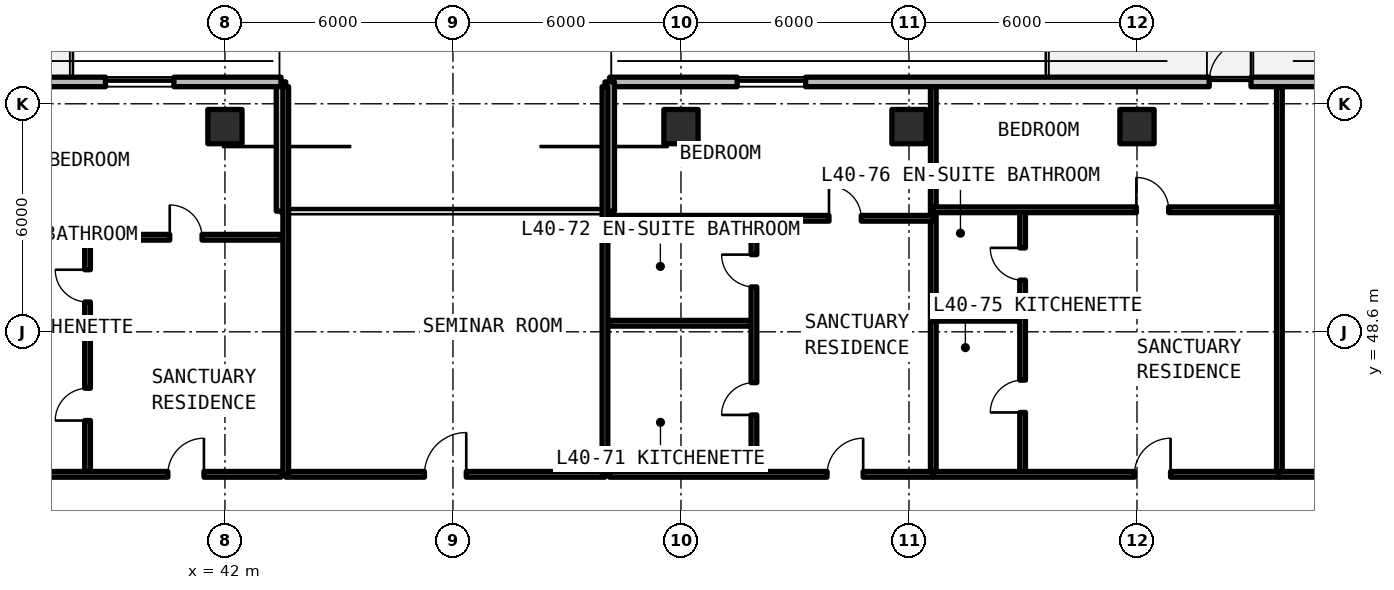
"""IFC4 building model, lengths in metres.
Left out: names, types, materials, properties, quantities, classifications, styles, units other than length and angle.
Written with IfcOpenShell. Run it as: python <this file> out.ifc"""

import sys

from ifc_helpers import new_model, si_unit, direction, frame, frame_2d, origin, origin_2d, place, context, subcontext, project, spatial, rectangle, extrude, element, fill, save


model = new_model("IFC4")
c1 = context("Model", 3, precision=1e-05, world=origin(), true_north=direction((0.0, 1.0)))
c2 = subcontext(c1, "Body", "Model", "MODEL_VIEW")
j1 = project(units=[si_unit("LENGTHUNIT", "METRE"), si_unit("PLANEANGLEUNIT", "RADIAN")], contexts=[c1])
p1 = place(None, origin())
s1 = spatial("IfcSite", under=j1, at=p1, CompositionType="ELEMENT")
p2 = place(p1, origin())
s2 = spatial("IfcBuilding", under=s1, at=p2, CompositionType="ELEMENT")
p3 = place(p2, frame((0.0, 0.0, 145.2)))
s3 = spatial("IfcBuildingStorey", under=s2, at=p3, CompositionType="ELEMENT", Elevation=145.2)
for number, where, z_axis, x_axis in (
    (1, (42.0, 54.0, 0.0), (0.0, 0.0, 1.0), (1.0, 0.0, 0.0)),
    (2, (54.0, 54.0, 0.0), (0.0, 0.0, 1.0), (1.0, 0.0, 0.0)),
    (3, (60.0, 54.0, 0.0), (0.0, 0.0, 1.0), (1.0, 0.0, 0.0)),
    (4, (66.0, 54.0, 0.0), (0.0, 0.0, 1.0), (1.0, 0.0, 0.0)),
):
    element("IfcColumn", number, at=place(p3, frame(where, z_axis=z_axis, x_axis=x_axis)), inside=s3, PredefinedType="COLUMN", context=c2, shape_type="SweptSolid", body=[
        extrude(rectangle(XDim=0.9, YDim=0.9, at=origin_2d()), origin(), (0.0, 0.0, 1.0), 3.3),
    ])
p4 = place(p3, frame((95.748, 55.175, 0.0), z_axis=(0.0, 0.0, 1.0), x_axis=(-1.0, 0.0, 0.0)))
e5 = element("IfcWall", 5, at=p4, inside=s3, PredefinedType="SOLIDWALL", context=c2, shape_type="SweptSolid", body=[
    extrude(rectangle(XDim=43.623, YDim=0.25, at=frame_2d((21.812, 0.0))), origin(), (0.0, 0.0, 1.0), 3.08),
])
p5 = place(p4, frame((26.748, 0.0, 0.0)))
e6 = element("IfcOpeningElement", 6, at=p5, cuts=e5, PredefinedType="OPENING", context=c2, shape_type="SweptSolid", body=[
    extrude(rectangle(XDim=1.1, YDim=2.15, at=frame_2d((0.55, 1.075))), frame((0.0, 0.135, 0.0), z_axis=(0.0, -1.0, 0.0), x_axis=(1.0, 0.0, 0.0)), (0.0, 0.0, 1.0), 0.27),
])
p6 = place(p4, frame((14.898, 0.0, 0.0)))
e7 = element("IfcOpeningElement", 7, at=p6, cuts=e5, PredefinedType="OPENING", context=c2, shape_type="SweptSolid", body=[
    extrude(rectangle(XDim=1.1, YDim=2.15, at=frame_2d((0.55, 1.075))), frame((0.0, 0.135, 0.0), z_axis=(0.0, -1.0, 0.0), x_axis=(1.0, 0.0, 0.0)), (0.0, 0.0, 1.0), 0.27),
])
p7 = place(p4, frame((38.468, 0.0, 0.78)))
e8 = element("IfcOpeningElement", 8, at=p7, cuts=e5, PredefinedType="OPENING", context=c2, shape_type="SweptSolid", body=[
    extrude(rectangle(XDim=1.8, YDim=1.66, at=frame_2d((0.9, 0.83))), frame((0.0, 0.135, 0.0), z_axis=(0.0, -1.0, 0.0), x_axis=(1.0, 0.0, 0.0)), (0.0, 0.0, 1.0), 0.27),
])
p8 = place(p4, frame((20.841, 0.0, 0.78)))
e9 = element("IfcOpeningElement", 9, at=p8, cuts=e5, PredefinedType="OPENING", context=c2, shape_type="SweptSolid", body=[
    extrude(rectangle(XDim=1.8, YDim=1.66, at=frame_2d((0.9, 0.83))), frame((0.0, 0.135, 0.0), z_axis=(0.0, -1.0, 0.0), x_axis=(1.0, 0.0, 0.0)), (0.0, 0.0, 1.0), 0.27),
])
p9 = place(p4, frame((3.188, 0.0, 0.78)))
e10 = element("IfcOpeningElement", 10, at=p9, cuts=e5, PredefinedType="OPENING", context=c2, shape_type="SweptSolid", body=[
    extrude(rectangle(XDim=1.8, YDim=1.66, at=frame_2d((0.9, 0.83))), frame((0.0, 0.135, 0.0), z_axis=(0.0, -1.0, 0.0), x_axis=(1.0, 0.0, 0.0)), (0.0, 0.0, 1.0), 0.27),
])
for number, where, z_axis, x_axis in (
    (11, (52.125, 55.175, 0.0), (0.0, 0.0, 1.0), (0.0, -1.0, 0.0)),
    (12, (43.475, 51.775, 0.0), (0.0, 0.0, 1.0), (0.0, 1.0, 0.0)),
):
    element("IfcWall", number, at=place(p3, frame(where, z_axis=z_axis, x_axis=x_axis)), inside=s3, PredefinedType="SOLIDWALL", context=c2, shape_type="SweptSolid", body=[
        extrude(rectangle(XDim=3.4, YDim=0.25, at=frame_2d((1.7, 0.0))), origin(), (0.0, 0.0, 1.0), 3.08),
    ])
p10 = place(p3, frame((43.475, 55.175, 0.0), z_axis=(0.0, 0.0, 1.0), x_axis=(-1.0, 0.0, 0.0)))
e13 = element("IfcWall", 13, at=p10, inside=s3, PredefinedType="SOLIDWALL", context=c2, shape_type="SweptSolid", body=[
    extrude(rectangle(XDim=19.623, YDim=0.25, at=frame_2d((9.812, 0.0))), origin(), (0.0, 0.0, 1.0), 3.08),
])
p11 = place(p10, frame((9.525, 0.0, 0.0)))
e14 = element("IfcOpeningElement", 14, at=p11, cuts=e13, PredefinedType="OPENING", context=c2, shape_type="SweptSolid", body=[
    extrude(rectangle(XDim=1.1, YDim=2.15, at=frame_2d((0.55, 1.075))), frame((0.0, 0.135, 0.0), z_axis=(0.0, -1.0, 0.0), x_axis=(1.0, 0.0, 0.0)), (0.0, 0.0, 1.0), 0.27),
])
p12 = place(p10, frame((18.0, 0.0, 0.78)))
e15 = element("IfcOpeningElement", 15, at=p12, cuts=e13, PredefinedType="OPENING", context=c2, shape_type="SweptSolid", body=[
    extrude(rectangle(XDim=0.85, YDim=1.65, at=frame_2d((0.425, 0.825))), frame((0.0, 0.135, 0.0), z_axis=(0.0, -1.0, 0.0), x_axis=(1.0, 0.0, 0.0)), (0.0, 0.0, 1.0), 0.27),
])
p13 = place(p10, frame((14.485, 0.0, 0.78)))
e16 = element("IfcOpeningElement", 16, at=p13, cuts=e13, PredefinedType="OPENING", context=c2, shape_type="SweptSolid", body=[
    extrude(rectangle(XDim=1.8, YDim=1.66, at=frame_2d((0.9, 0.83))), frame((0.0, 0.135, 0.0), z_axis=(0.0, -1.0, 0.0), x_axis=(1.0, 0.0, 0.0)), (0.0, 0.0, 1.0), 0.27),
])
p14 = place(p10, frame((2.818, 0.0, 0.78)))
e17 = element("IfcOpeningElement", 17, at=p14, cuts=e13, PredefinedType="OPENING", context=c2, shape_type="SweptSolid", body=[
    extrude(rectangle(XDim=1.8, YDim=1.66, at=frame_2d((0.9, 0.83))), frame((0.0, 0.135, 0.0), z_axis=(0.0, -1.0, 0.0), x_axis=(1.0, 0.0, 0.0)), (0.0, 0.0, 1.0), 0.27),
])
p15 = place(p3, frame((43.6, 44.85, 0.0), z_axis=(0.0, 0.0, 1.0), x_axis=(1.0, 0.0, 0.0)))
e18 = element("IfcWall", 18, at=p15, inside=s3, PredefinedType="SOLIDWALL", context=c2, shape_type="SweptSolid", body=[
    extrude(rectangle(XDim=8.4, YDim=0.15, at=frame_2d((4.2, 0.0))), origin(), (0.0, 0.0, 1.0), 2.35),
])
p16 = place(p15, frame((3.65, 0.0, 0.0)))
e19 = element("IfcOpeningElement", 19, at=p16, cuts=e18, PredefinedType="OPENING", context=c2, shape_type="SweptSolid", body=[
    extrude(rectangle(XDim=1.1, YDim=2.15, at=frame_2d((0.55, 1.075))), frame((0.0, 0.085, 0.0), z_axis=(0.0, -1.0, 0.0), x_axis=(1.0, 0.0, 0.0)), (0.0, 0.0, 1.0), 0.17),
])
for number, where, z_axis, x_axis in (
    (20, (43.6, 44.85, 0.0), (0.0, 0.0, 1.0), (0.0, 1.0, 0.0)),
    (21, (52.0, 44.85, 0.0), (0.0, 0.0, 1.0), (0.0, 1.0, 0.0)),
):
    element("IfcWall", number, at=place(p3, frame(where, z_axis=z_axis, x_axis=x_axis)), inside=s3, PredefinedType="SOLIDWALL", context=c2, shape_type="SweptSolid", body=[
        extrude(rectangle(XDim=10.2, YDim=0.15, at=frame_2d((5.1, 0.0))), origin(), (0.0, 0.0, 1.0), 2.35),
    ])
p17 = place(p3, frame((36.035, 48.53, 0.0), z_axis=(0.0, 0.0, 1.0), x_axis=(1.0, 0.0, 0.0)))
e22 = element("IfcWall", 22, at=p17, inside=s3, PredefinedType="PARTITIONING", context=c2, shape_type="SweptSolid", body=[
    extrude(rectangle(XDim=2.35, YDim=0.15, at=frame_2d((1.175, 0.0))), origin(), (0.0, 0.0, 1.0), 2.35),
])
p18 = place(p3, frame((38.385, 44.85, 0.0), z_axis=(0.0, 0.0, 1.0), x_axis=(0.0, 1.0, 0.0)))
e23 = element("IfcWall", 23, at=p18, inside=s3, PredefinedType="PARTITIONING", context=c2, shape_type="SweptSolid", body=[
    extrude(rectangle(XDim=6.238, YDim=0.15, at=frame_2d((3.119, 0.0))), origin(), (0.0, 0.0, 1.0), 2.35),
])
p19 = place(p18, frame((1.415, 0.0, 0.0)))
e24 = element("IfcOpeningElement", 24, at=p19, cuts=e23, PredefinedType="OPENING", context=c2, shape_type="SweptSolid", body=[
    extrude(rectangle(XDim=0.85, YDim=2.1, at=frame_2d((0.425, 1.05))), frame((0.0, 0.085, 0.0), z_axis=(0.0, -1.0, 0.0), x_axis=(1.0, 0.0, 0.0)), (0.0, 0.0, 1.0), 0.17),
])
p20 = place(p18, frame((4.534, 0.0, 0.0)))
e25 = element("IfcOpeningElement", 25, at=p20, cuts=e23, PredefinedType="OPENING", context=c2, shape_type="SweptSolid", body=[
    extrude(rectangle(XDim=0.85, YDim=2.1, at=frame_2d((0.425, 1.05))), frame((0.0, 0.085, 0.0), z_axis=(0.0, -1.0, 0.0), x_axis=(1.0, 0.0, 0.0)), (0.0, 0.0, 1.0), 0.17),
])
p21 = place(p3, frame((36.035, 51.088, 0.0), z_axis=(0.0, 0.0, 1.0), x_axis=(1.0, 0.0, 0.0)))
e26 = element("IfcWall", 26, at=p21, inside=s3, PredefinedType="PARTITIONING", context=c2, shape_type="SweptSolid", body=[
    extrude(rectangle(XDim=7.445, YDim=0.15, at=frame_2d((3.723, 0.0))), origin(), (0.0, 0.0, 1.0), 2.35),
])
p22 = place(p21, frame((4.513, 0.0, 0.0)))
e27 = element("IfcOpeningElement", 27, at=p22, cuts=e26, PredefinedType="OPENING", context=c2, shape_type="SweptSolid", body=[
    extrude(rectangle(XDim=0.85, YDim=2.1, at=frame_2d((0.425, 1.05))), frame((0.0, 0.085, 0.0), z_axis=(0.0, -1.0, 0.0), x_axis=(1.0, 0.0, 0.0)), (0.0, 0.0, 1.0), 0.17),
])
p23 = place(p3, frame((36.035, 44.85, 0.0), z_axis=(0.0, 0.0, 1.0), x_axis=(1.0, 0.0, 0.0)))
e28 = element("IfcWall", 28, at=p23, inside=s3, PredefinedType="SOLIDWALL", context=c2, shape_type="SweptSolid", body=[
    extrude(rectangle(XDim=7.445, YDim=0.15, at=frame_2d((3.723, 0.0))), origin(), (0.0, 0.0, 1.0), 2.35),
])
p24 = place(p23, frame((4.463, 0.0, 0.0)))
e29 = element("IfcOpeningElement", 29, at=p24, cuts=e28, PredefinedType="OPENING", context=c2, shape_type="SweptSolid", body=[
    extrude(rectangle(XDim=0.95, YDim=2.15, at=frame_2d((0.475, 1.075))), frame((0.0, 0.085, 0.0), z_axis=(0.0, -1.0, 0.0), x_axis=(1.0, 0.0, 0.0)), (0.0, 0.0, 1.0), 0.17),
])
p25 = place(p3, frame((60.64, 44.85, 0.0), z_axis=(0.0, 0.0, 1.0), x_axis=(0.0, 1.0, 0.0)))
e30 = element("IfcWall", 30, at=p25, inside=s3, PredefinedType="SOLIDWALL", context=c2, shape_type="SweptSolid", body=[
    extrude(rectangle(XDim=10.2, YDim=0.15, at=frame_2d((5.1, 0.0))), origin(), (0.0, 0.0, 1.0), 2.35),
])
p26 = place(p3, frame((52.12, 48.825, 0.0), z_axis=(0.0, 0.0, 1.0), x_axis=(1.0, 0.0, 0.0)))
e31 = element("IfcWall", 31, at=p26, inside=s3, PredefinedType="PARTITIONING", context=c2, shape_type="SweptSolid", body=[
    extrude(rectangle(XDim=3.8, YDim=0.15, at=frame_2d((1.9, 0.0))), origin(), (0.0, 0.0, 1.0), 2.35),
])
p27 = place(p3, frame((55.92, 44.85, 0.0), z_axis=(0.0, 0.0, 1.0), x_axis=(0.0, 1.0, 0.0)))
e32 = element("IfcWall", 32, at=p27, inside=s3, PredefinedType="PARTITIONING", context=c2, shape_type="SweptSolid", body=[
    extrude(rectangle(XDim=6.737, YDim=0.15, at=frame_2d((3.369, 0.0))), origin(), (0.0, 0.0, 1.0), 2.35),
])
p28 = place(p27, frame((1.562, 0.0, 0.0)))
e33 = element("IfcOpeningElement", 33, at=p28, cuts=e32, PredefinedType="OPENING", context=c2, shape_type="SweptSolid", body=[
    extrude(rectangle(XDim=0.85, YDim=2.1, at=frame_2d((0.425, 1.05))), frame((0.0, 0.085, 0.0), z_axis=(0.0, -1.0, 0.0), x_axis=(1.0, 0.0, 0.0)), (0.0, 0.0, 1.0), 0.17),
])
p29 = place(p27, frame((4.931, 0.0, 0.0)))
e34 = element("IfcOpeningElement", 34, at=p29, cuts=e32, PredefinedType="OPENING", context=c2, shape_type="SweptSolid", body=[
    extrude(rectangle(XDim=0.85, YDim=2.1, at=frame_2d((0.425, 1.05))), frame((0.0, 0.085, 0.0), z_axis=(0.0, -1.0, 0.0), x_axis=(1.0, 0.0, 0.0)), (0.0, 0.0, 1.0), 0.17),
])
p30 = place(p3, frame((52.12, 51.587, 0.0), z_axis=(0.0, 0.0, 1.0), x_axis=(1.0, 0.0, 0.0)))
e35 = element("IfcWall", 35, at=p30, inside=s3, PredefinedType="PARTITIONING", context=c2, shape_type="SweptSolid", body=[
    extrude(rectangle(XDim=8.52, YDim=0.15, at=frame_2d((4.26, 0.0))), origin(), (0.0, 0.0, 1.0), 2.35),
])
p31 = place(p30, frame((5.775, 0.0, 0.0)))
e36 = element("IfcOpeningElement", 36, at=p31, cuts=e35, PredefinedType="OPENING", context=c2, shape_type="SweptSolid", body=[
    extrude(rectangle(XDim=0.85, YDim=2.1, at=frame_2d((0.425, 1.05))), frame((0.0, 0.085, 0.0), z_axis=(0.0, -1.0, 0.0), x_axis=(1.0, 0.0, 0.0)), (0.0, 0.0, 1.0), 0.17),
])
p32 = place(p3, frame((52.12, 44.85, 0.0), z_axis=(0.0, 0.0, 1.0), x_axis=(1.0, 0.0, 0.0)))
e37 = element("IfcWall", 37, at=p32, inside=s3, PredefinedType="SOLIDWALL", context=c2, shape_type="SweptSolid", body=[
    extrude(rectangle(XDim=8.52, YDim=0.15, at=frame_2d((4.26, 0.0))), origin(), (0.0, 0.0, 1.0), 2.35),
])
p33 = place(p32, frame((5.725, 0.0, 0.0)))
e38 = element("IfcOpeningElement", 38, at=p33, cuts=e37, PredefinedType="OPENING", context=c2, shape_type="SweptSolid", body=[
    extrude(rectangle(XDim=0.95, YDim=2.15, at=frame_2d((0.475, 1.075))), frame((0.0, 0.085, 0.0), z_axis=(0.0, -1.0, 0.0), x_axis=(1.0, 0.0, 0.0)), (0.0, 0.0, 1.0), 0.17),
])
p34 = place(p3, frame((69.747, 44.85, 0.0), z_axis=(0.0, 0.0, 1.0), x_axis=(0.0, 1.0, 0.0)))
e39 = element("IfcWall", 39, at=p34, inside=s3, PredefinedType="SOLIDWALL", context=c2, shape_type="SweptSolid", body=[
    extrude(rectangle(XDim=10.2, YDim=0.15, at=frame_2d((5.1, 0.0))), origin(), (0.0, 0.0, 1.0), 2.35),
])
p35 = place(p3, frame((60.64, 48.957, 0.0), z_axis=(0.0, 0.0, 1.0), x_axis=(1.0, 0.0, 0.0)))
e40 = element("IfcWall", 40, at=p35, inside=s3, PredefinedType="PARTITIONING", context=c2, shape_type="SweptSolid", body=[
    extrude(rectangle(XDim=2.35, YDim=0.15, at=frame_2d((1.175, 0.0))), origin(), (0.0, 0.0, 1.0), 2.35),
])
p36 = place(p3, frame((62.99, 44.85, 0.0), z_axis=(0.0, 0.0, 1.0), x_axis=(0.0, 1.0, 0.0)))
e41 = element("IfcWall", 41, at=p36, inside=s3, PredefinedType="PARTITIONING", context=c2, shape_type="SweptSolid", body=[
    extrude(rectangle(XDim=6.961, YDim=0.15, at=frame_2d((3.48, 0.0))), origin(), (0.0, 0.0, 1.0), 2.35),
])
p37 = place(p36, frame((1.628, 0.0, 0.0)))
e42 = element("IfcOpeningElement", 42, at=p37, cuts=e41, PredefinedType="OPENING", context=c2, shape_type="SweptSolid", body=[
    extrude(rectangle(XDim=0.85, YDim=2.1, at=frame_2d((0.425, 1.05))), frame((0.0, 0.085, 0.0), z_axis=(0.0, -1.0, 0.0), x_axis=(1.0, 0.0, 0.0)), (0.0, 0.0, 1.0), 0.17),
])
p38 = place(p36, frame((5.109, 0.0, 0.0)))
e43 = element("IfcOpeningElement", 43, at=p38, cuts=e41, PredefinedType="OPENING", context=c2, shape_type="SweptSolid", body=[
    extrude(rectangle(XDim=0.85, YDim=2.1, at=frame_2d((0.425, 1.05))), frame((0.0, 0.085, 0.0), z_axis=(0.0, -1.0, 0.0), x_axis=(1.0, 0.0, 0.0)), (0.0, 0.0, 1.0), 0.17),
])
p39 = place(p3, frame((60.64, 51.811, 0.0), z_axis=(0.0, 0.0, 1.0), x_axis=(1.0, 0.0, 0.0)))
e44 = element("IfcWall", 44, at=p39, inside=s3, PredefinedType="PARTITIONING", context=c2, shape_type="SweptSolid", body=[
    extrude(rectangle(XDim=9.107, YDim=0.15, at=frame_2d((4.554, 0.0))), origin(), (0.0, 0.0, 1.0), 2.35),
])
p40 = place(p39, frame((5.344, 0.0, 0.0)))
e45 = element("IfcOpeningElement", 45, at=p40, cuts=e44, PredefinedType="OPENING", context=c2, shape_type="SweptSolid", body=[
    extrude(rectangle(XDim=0.85, YDim=2.1, at=frame_2d((0.425, 1.05))), frame((0.0, 0.085, 0.0), z_axis=(0.0, -1.0, 0.0), x_axis=(1.0, 0.0, 0.0)), (0.0, 0.0, 1.0), 0.17),
])
p41 = place(p3, frame((60.64, 44.85, 0.0), z_axis=(0.0, 0.0, 1.0), x_axis=(1.0, 0.0, 0.0)))
e46 = element("IfcWall", 46, at=p41, inside=s3, PredefinedType="SOLIDWALL", context=c2, shape_type="SweptSolid", body=[
    extrude(rectangle(XDim=9.107, YDim=0.15, at=frame_2d((4.554, 0.0))), origin(), (0.0, 0.0, 1.0), 2.35),
])
p42 = place(p41, frame((5.294, 0.0, 0.0)))
e47 = element("IfcOpeningElement", 47, at=p42, cuts=e46, PredefinedType="OPENING", context=c2, shape_type="SweptSolid", body=[
    extrude(rectangle(XDim=0.95, YDim=2.15, at=frame_2d((0.475, 1.075))), frame((0.0, 0.085, 0.0), z_axis=(0.0, -1.0, 0.0), x_axis=(1.0, 0.0, 0.0)), (0.0, 0.0, 1.0), 0.17),
])
p43 = place(p3, frame((69.747, 44.85, 0.0), z_axis=(0.0, 0.0, 1.0), x_axis=(1.0, 0.0, 0.0)))
e48 = element("IfcWall", 48, at=p43, inside=s3, PredefinedType="SOLIDWALL", context=c2, shape_type="SweptSolid", body=[
    extrude(rectangle(XDim=8.52, YDim=0.15, at=frame_2d((4.26, 0.0))), origin(), (0.0, 0.0, 1.0), 2.35),
])
p44 = place(p43, frame((3.71, 0.0, 0.0)))
e49 = element("IfcOpeningElement", 49, at=p44, cuts=e48, PredefinedType="OPENING", context=c2, shape_type="SweptSolid", body=[
    extrude(rectangle(XDim=1.1, YDim=2.15, at=frame_2d((0.55, 1.075))), frame((0.0, 0.085, 0.0), z_axis=(0.0, -1.0, 0.0), x_axis=(1.0, 0.0, 0.0)), (0.0, 0.0, 1.0), 0.17),
])
p45 = place(p5, frame((1.1, 0.0, 0.0), z_axis=(0.0, 0.0, 1.0), x_axis=(-1.0, 0.0, 0.0)))
e50 = element("IfcDoor", 50, at=p45, inside=s3, OperationType="SINGLE_SWING_RIGHT", PredefinedType="DOOR", context=c2, shape_type="SweptSolid", body=[
    extrude(rectangle(XDim=1.1, YDim=2.15, at=frame_2d((0.55, 1.075))), frame((0.0, 0.025, 0.0), z_axis=(0.0, -1.0, 0.0), x_axis=(1.0, 0.0, 0.0)), (0.0, 0.0, 1.0), 0.05),
])
fill(e6, e50)
p46 = place(p7, origin())
e51 = element("IfcWindow", 51, at=p46, inside=s3, PartitioningType="SINGLE_PANEL", PredefinedType="WINDOW", context=c2, shape_type="SweptSolid", body=[
    extrude(rectangle(XDim=1.8, YDim=1.66, at=frame_2d((0.9, 0.83))), frame((0.0, 0.03, 0.0), z_axis=(0.0, -1.0, 0.0), x_axis=(1.0, 0.0, 0.0)), (0.0, 0.0, 1.0), 0.06),
])
fill(e8, e51)
p47 = place(p14, origin())
e52 = element("IfcWindow", 52, at=p47, inside=s3, PartitioningType="SINGLE_PANEL", PredefinedType="WINDOW", context=c2, shape_type="SweptSolid", body=[
    extrude(rectangle(XDim=1.8, YDim=1.66, at=frame_2d((0.9, 0.83))), frame((0.0, 0.03, 0.0), z_axis=(0.0, -1.0, 0.0), x_axis=(1.0, 0.0, 0.0)), (0.0, 0.0, 1.0), 0.06),
])
fill(e17, e52)
p48 = place(p16, origin())
e53 = element("IfcDoor", 53, at=p48, inside=s3, OperationType="SINGLE_SWING_RIGHT", PredefinedType="DOOR", context=c2, shape_type="SweptSolid", body=[
    extrude(rectangle(XDim=1.1, YDim=2.15, at=frame_2d((0.55, 1.075))), frame((0.0, 0.025, 0.0), z_axis=(0.0, -1.0, 0.0), x_axis=(1.0, 0.0, 0.0)), (0.0, 0.0, 1.0), 0.05),
])
fill(e19, e53)
p49 = place(p19, origin())
e54 = element("IfcDoor", 54, at=p49, inside=s3, OperationType="SINGLE_SWING_LEFT", PredefinedType="DOOR", context=c2, shape_type="SweptSolid", body=[
    extrude(rectangle(XDim=0.85, YDim=2.1, at=frame_2d((0.425, 1.05))), frame((0.0, 0.025, 0.0), z_axis=(0.0, -1.0, 0.0), x_axis=(1.0, 0.0, 0.0)), (0.0, 0.0, 1.0), 0.05),
])
fill(e24, e54)
p50 = place(p20, origin())
e55 = element("IfcDoor", 55, at=p50, inside=s3, OperationType="SINGLE_SWING_RIGHT", PredefinedType="DOOR", context=c2, shape_type="SweptSolid", body=[
    extrude(rectangle(XDim=0.85, YDim=2.1, at=frame_2d((0.425, 1.05))), frame((0.0, 0.025, 0.0), z_axis=(0.0, -1.0, 0.0), x_axis=(1.0, 0.0, 0.0)), (0.0, 0.0, 1.0), 0.05),
])
fill(e25, e55)
p51 = place(p22, origin())
e56 = element("IfcDoor", 56, at=p51, inside=s3, OperationType="SINGLE_SWING_LEFT", PredefinedType="DOOR", context=c2, shape_type="SweptSolid", body=[
    extrude(rectangle(XDim=0.85, YDim=2.1, at=frame_2d((0.425, 1.05))), frame((0.0, 0.025, 0.0), z_axis=(0.0, -1.0, 0.0), x_axis=(1.0, 0.0, 0.0)), (0.0, 0.0, 1.0), 0.05),
])
fill(e27, e56)
p52 = place(p24, origin())
e57 = element("IfcDoor", 57, at=p52, inside=s3, OperationType="SINGLE_SWING_RIGHT", PredefinedType="DOOR", context=c2, shape_type="SweptSolid", body=[
    extrude(rectangle(XDim=0.95, YDim=2.15, at=frame_2d((0.475, 1.075))), frame((0.0, 0.025, 0.0), z_axis=(0.0, -1.0, 0.0), x_axis=(1.0, 0.0, 0.0)), (0.0, 0.0, 1.0), 0.05),
])
fill(e29, e57)
p53 = place(p28, origin())
e58 = element("IfcDoor", 58, at=p53, inside=s3, OperationType="SINGLE_SWING_LEFT", PredefinedType="DOOR", context=c2, shape_type="SweptSolid", body=[
    extrude(rectangle(XDim=0.85, YDim=2.1, at=frame_2d((0.425, 1.05))), frame((0.0, 0.025, 0.0), z_axis=(0.0, -1.0, 0.0), x_axis=(1.0, 0.0, 0.0)), (0.0, 0.0, 1.0), 0.05),
])
fill(e33, e58)
p54 = place(p29, origin())
e59 = element("IfcDoor", 59, at=p54, inside=s3, OperationType="SINGLE_SWING_RIGHT", PredefinedType="DOOR", context=c2, shape_type="SweptSolid", body=[
    extrude(rectangle(XDim=0.85, YDim=2.1, at=frame_2d((0.425, 1.05))), frame((0.0, 0.025, 0.0), z_axis=(0.0, -1.0, 0.0), x_axis=(1.0, 0.0, 0.0)), (0.0, 0.0, 1.0), 0.05),
])
fill(e34, e59)
p55 = place(p31, origin())
e60 = element("IfcDoor", 60, at=p55, inside=s3, OperationType="SINGLE_SWING_LEFT", PredefinedType="DOOR", context=c2, shape_type="SweptSolid", body=[
    extrude(rectangle(XDim=0.85, YDim=2.1, at=frame_2d((0.425, 1.05))), frame((0.0, 0.025, 0.0), z_axis=(0.0, -1.0, 0.0), x_axis=(1.0, 0.0, 0.0)), (0.0, 0.0, 1.0), 0.05),
])
fill(e36, e60)
p56 = place(p33, origin())
e61 = element("IfcDoor", 61, at=p56, inside=s3, OperationType="SINGLE_SWING_RIGHT", PredefinedType="DOOR", context=c2, shape_type="SweptSolid", body=[
    extrude(rectangle(XDim=0.95, YDim=2.15, at=frame_2d((0.475, 1.075))), frame((0.0, 0.025, 0.0), z_axis=(0.0, -1.0, 0.0), x_axis=(1.0, 0.0, 0.0)), (0.0, 0.0, 1.0), 0.05),
])
fill(e38, e61)
p57 = place(p37, origin())
e62 = element("IfcDoor", 62, at=p57, inside=s3, OperationType="SINGLE_SWING_LEFT", PredefinedType="DOOR", context=c2, shape_type="SweptSolid", body=[
    extrude(rectangle(XDim=0.85, YDim=2.1, at=frame_2d((0.425, 1.05))), frame((0.0, 0.025, 0.0), z_axis=(0.0, -1.0, 0.0), x_axis=(1.0, 0.0, 0.0)), (0.0, 0.0, 1.0), 0.05),
])
fill(e42, e62)
p58 = place(p38, origin())
e63 = element("IfcDoor", 63, at=p58, inside=s3, OperationType="SINGLE_SWING_RIGHT", PredefinedType="DOOR", context=c2, shape_type="SweptSolid", body=[
    extrude(rectangle(XDim=0.85, YDim=2.1, at=frame_2d((0.425, 1.05))), frame((0.0, 0.025, 0.0), z_axis=(0.0, -1.0, 0.0), x_axis=(1.0, 0.0, 0.0)), (0.0, 0.0, 1.0), 0.05),
])
fill(e43, e63)
p59 = place(p40, origin())
e64 = element("IfcDoor", 64, at=p59, inside=s3, OperationType="SINGLE_SWING_LEFT", PredefinedType="DOOR", context=c2, shape_type="SweptSolid", body=[
    extrude(rectangle(XDim=0.85, YDim=2.1, at=frame_2d((0.425, 1.05))), frame((0.0, 0.025, 0.0), z_axis=(0.0, -1.0, 0.0), x_axis=(1.0, 0.0, 0.0)), (0.0, 0.0, 1.0), 0.05),
])
fill(e45, e64)
p60 = place(p42, origin())
e65 = element("IfcDoor", 65, at=p60, inside=s3, OperationType="SINGLE_SWING_RIGHT", PredefinedType="DOOR", context=c2, shape_type="SweptSolid", body=[
    extrude(rectangle(XDim=0.95, YDim=2.15, at=frame_2d((0.475, 1.075))), frame((0.0, 0.025, 0.0), z_axis=(0.0, -1.0, 0.0), x_axis=(1.0, 0.0, 0.0)), (0.0, 0.0, 1.0), 0.05),
])
fill(e47, e65)
save(model, sys.argv[1])
